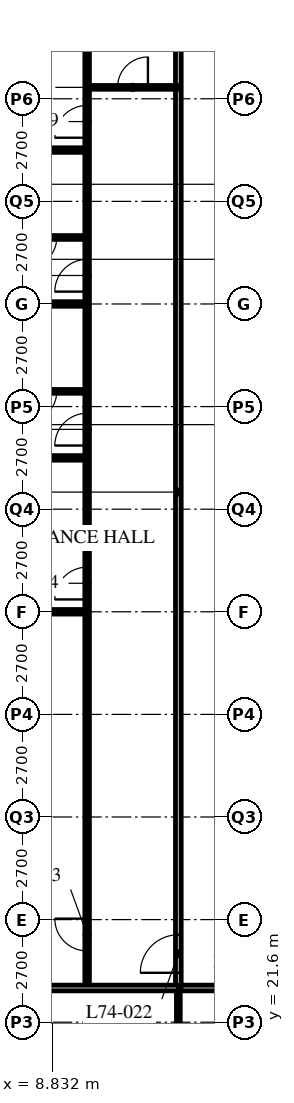
"""IFC4 building model, lengths in metres.
Left out: names, types, materials, properties, quantities, classifications, styles, units other than length and angle.
Written with IfcOpenShell. Run it as: python <this file> out.ifc"""

import sys

from ifc_helpers import new_model, si_unit, direction, frame, frame_2d, origin, place, context, subcontext, project, spatial, rectangle, extrude, element, fill, save


model = new_model("IFC4")
c1 = context("Model", 3, precision=1e-05, world=origin(), true_north=direction((0.0, 1.0)))
c2 = subcontext(c1, "Body", "Model", "MODEL_VIEW")
j1 = project(units=[si_unit("LENGTHUNIT", "METRE"), si_unit("PLANEANGLEUNIT", "RADIAN")], contexts=[c1])
p1 = place(None, origin())
s1 = spatial("IfcSite", under=j1, at=p1, CompositionType="ELEMENT")
p2 = place(p1, origin())
s2 = spatial("IfcBuilding", under=s1, at=p2, CompositionType="ELEMENT")
p3 = place(p2, frame((0.0, 0.0, 289.2)))
s3 = spatial("IfcBuildingStorey", under=s2, at=p3, CompositionType="ELEMENT", Elevation=289.2)
p4 = place(p3, frame((12.15, 22.5, 0.0), z_axis=(0.0, 0.0, 1.0), x_axis=(1.0, 0.0, 0.0)))
e1 = element("IfcWall", 1, at=p4, inside=s3, PredefinedType="PARTITIONING", context=c2, shape_type="SweptSolid", body=[
    extrude(rectangle(XDim=24.3, YDim=0.15, at=frame_2d((12.15, 0.0))), origin(), (0.0, 0.0, 1.0), 3.69),
])
p5 = place(p4, frame((4.45, 0.0, 0.0)))
e2 = element("IfcOpeningElement", 2, at=p5, cuts=e1, PredefinedType="OPENING", context=c2, shape_type="SweptSolid", body=[
    extrude(rectangle(XDim=1.0, YDim=2.1, at=frame_2d((0.5, 1.05))), frame((0.0, 0.085, 0.0), z_axis=(0.0, -1.0, 0.0), x_axis=(1.0, 0.0, 0.0)), (0.0, 0.0, 1.0), 0.17),
])
p6 = place(p4, frame((22.6, 0.0, 0.0)))
e3 = element("IfcOpeningElement", 3, at=p6, cuts=e1, PredefinedType="OPENING", context=c2, shape_type="SweptSolid", body=[
    extrude(rectangle(XDim=1.0, YDim=2.1, at=frame_2d((0.5, 1.05))), frame((0.0, 0.085, 0.0), z_axis=(0.0, -1.0, 0.0), x_axis=(1.0, 0.0, 0.0)), (0.0, 0.0, 1.0), 0.17),
])
p7 = place(p4, frame((2.625, 0.0, 0.0)))
e4 = element("IfcOpeningElement", 4, at=p7, cuts=e1, PredefinedType="OPENING", context=c2, shape_type="SweptSolid", body=[
    extrude(rectangle(XDim=1.0, YDim=2.1, at=frame_2d((0.5, 1.05))), frame((0.0, 0.085, 0.0), z_axis=(0.0, -1.0, 0.0), x_axis=(1.0, 0.0, 0.0)), (0.0, 0.0, 1.0), 0.17),
])
p8 = place(p3, frame((12.15, 22.5, 0.0), z_axis=(0.0, 0.0, 1.0), x_axis=(0.0, 1.0, 0.0)))
e5 = element("IfcWall", 5, at=p8, inside=s3, PredefinedType="PARTITIONING", context=c2, shape_type="SweptSolid", body=[
    extrude(rectangle(XDim=26.1, YDim=0.15, at=frame_2d((13.05, 0.0))), origin(), (0.0, 0.0, 1.0), 3.69),
])
p9 = place(p8, frame((0.4, 0.0, 0.0)))
e6 = element("IfcOpeningElement", 6, at=p9, cuts=e5, PredefinedType="OPENING", context=c2, shape_type="SweptSolid", body=[
    extrude(rectangle(XDim=1.0, YDim=2.1, at=frame_2d((0.5, 1.05))), frame((0.0, 0.085, 0.0), z_axis=(0.0, -1.0, 0.0), x_axis=(1.0, 0.0, 0.0)), (0.0, 0.0, 1.0), 0.17),
])
p10 = place(p3, frame((9.75, 22.5, 0.0), z_axis=(0.0, 0.0, 1.0), x_axis=(0.0, 1.0, 0.0)))
e7 = element("IfcWall", 7, at=p10, inside=s3, PredefinedType="PARTITIONING", context=c2, shape_type="SweptSolid", body=[
    extrude(rectangle(XDim=26.1, YDim=0.12, at=frame_2d((13.05, 0.0))), origin(), (0.0, 0.0, 1.0), 3.69),
])
p11 = place(p10, frame((0.975, 0.0, 0.0)))
e8 = element("IfcOpeningElement", 8, at=p11, cuts=e7, PredefinedType="OPENING", context=c2, shape_type="SweptSolid", body=[
    extrude(rectangle(XDim=0.85, YDim=2.1, at=frame_2d((0.425, 1.05))), frame((0.0, 0.07, 0.0), z_axis=(0.0, -1.0, 0.0), x_axis=(1.0, 0.0, 0.0)), (0.0, 0.0, 1.0), 0.14),
])
p12 = place(p10, frame((10.225, 0.0, 0.0)))
e9 = element("IfcOpeningElement", 9, at=p12, cuts=e7, PredefinedType="OPENING", context=c2, shape_type="SweptSolid", body=[
    extrude(rectangle(XDim=0.85, YDim=2.1, at=frame_2d((0.425, 1.05))), frame((0.0, 0.07, 0.0), z_axis=(0.0, -1.0, 0.0), x_axis=(1.0, 0.0, 0.0)), (0.0, 0.0, 1.0), 0.14),
])
p13 = place(p10, frame((14.275, 0.0, 0.0)))
e10 = element("IfcOpeningElement", 10, at=p13, cuts=e7, PredefinedType="OPENING", context=c2, shape_type="SweptSolid", body=[
    extrude(rectangle(XDim=0.85, YDim=2.1, at=frame_2d((0.425, 1.05))), frame((0.0, 0.07, 0.0), z_axis=(0.0, -1.0, 0.0), x_axis=(1.0, 0.0, 0.0)), (0.0, 0.0, 1.0), 0.14),
])
p14 = place(p10, frame((18.325, 0.0, 0.0)))
e11 = element("IfcOpeningElement", 11, at=p14, cuts=e7, PredefinedType="OPENING", context=c2, shape_type="SweptSolid", body=[
    extrude(rectangle(XDim=0.85, YDim=2.1, at=frame_2d((0.425, 1.05))), frame((0.0, 0.07, 0.0), z_axis=(0.0, -1.0, 0.0), x_axis=(1.0, 0.0, 0.0)), (0.0, 0.0, 1.0), 0.14),
])
p15 = place(p10, frame((22.375, 0.0, 0.0)))
e12 = element("IfcOpeningElement", 12, at=p15, cuts=e7, PredefinedType="OPENING", context=c2, shape_type="SweptSolid", body=[
    extrude(rectangle(XDim=0.85, YDim=2.1, at=frame_2d((0.425, 1.05))), frame((0.0, 0.07, 0.0), z_axis=(0.0, -1.0, 0.0), x_axis=(1.0, 0.0, 0.0)), (0.0, 0.0, 1.0), 0.14),
])
p16 = place(p3, frame((12.15, 46.2, 0.0), z_axis=(0.0, 0.0, 1.0), x_axis=(-1.0, 0.0, 0.0)))
e13 = element("IfcWall", 13, at=p16, inside=s3, PredefinedType="PARTITIONING", context=c2, shape_type="SweptSolid", body=[
    extrude(rectangle(XDim=2.4, YDim=0.1, at=frame_2d((1.2, 0.0))), origin(), (0.0, 0.0, 1.0), 3.69),
])
p17 = place(p16, frame((0.8, 0.0, 0.0)))
e14 = element("IfcOpeningElement", 14, at=p17, cuts=e13, PredefinedType="OPENING", context=c2, shape_type="SweptSolid", body=[
    extrude(rectangle(XDim=0.8, YDim=2.1, at=frame_2d((0.4, 1.05))), frame((0.0, 0.06, 0.0), z_axis=(0.0, -1.0, 0.0), x_axis=(1.0, 0.0, 0.0)), (0.0, 0.0, 1.0), 0.12),
])
p18 = place(p3, frame((9.75, 32.4, 0.0), z_axis=(0.0, 0.0, 1.0), x_axis=(-1.0, 0.0, 0.0)))
e15 = element("IfcWall", 15, at=p18, inside=s3, PredefinedType="PARTITIONING", context=c2, shape_type="SweptSolid", body=[
    extrude(rectangle(XDim=9.45, YDim=0.12, at=frame_2d((4.725, 0.0))), origin(), (0.0, 0.0, 1.0), 3.078),
])
p19 = place(p3, frame((9.75, 38.2, 0.0), z_axis=(0.0, 0.0, 1.0), x_axis=(-1.0, 0.0, 0.0)))
e16 = element("IfcWall", 16, at=p19, inside=s3, PredefinedType="PARTITIONING", context=c2, shape_type="SweptSolid", body=[
    extrude(rectangle(XDim=2.4, YDim=0.1, at=frame_2d((1.2, 0.0))), origin(), (0.0, 0.0, 1.0), 3.69),
])
p20 = place(p19, frame((0.8, 0.0, 0.0)))
e17 = element("IfcOpeningElement", 17, at=p20, cuts=e16, PredefinedType="OPENING", context=c2, shape_type="SweptSolid", body=[
    extrude(rectangle(XDim=0.8, YDim=2.1, at=frame_2d((0.4, 1.05))), frame((0.0, 0.06, 0.0), z_axis=(0.0, -1.0, 0.0), x_axis=(1.0, 0.0, 0.0)), (0.0, 0.0, 1.0), 0.12),
])
p21 = place(p3, frame((9.75, 36.45, 0.0), z_axis=(0.0, 0.0, 1.0), x_axis=(-1.0, 0.0, 0.0)))
e18 = element("IfcWall", 18, at=p21, inside=s3, PredefinedType="PARTITIONING", context=c2, shape_type="SweptSolid", body=[
    extrude(rectangle(XDim=9.45, YDim=0.12, at=frame_2d((4.725, 0.0))), origin(), (0.0, 0.0, 1.0), 3.69),
])
p22 = place(p3, frame((9.75, 42.25, 0.0), z_axis=(0.0, 0.0, 1.0), x_axis=(-1.0, 0.0, 0.0)))
e19 = element("IfcWall", 19, at=p22, inside=s3, PredefinedType="PARTITIONING", context=c2, shape_type="SweptSolid", body=[
    extrude(rectangle(XDim=2.4, YDim=0.1, at=frame_2d((1.2, 0.0))), origin(), (0.0, 0.0, 1.0), 3.69),
])
p23 = place(p22, frame((0.8, 0.0, 0.0)))
e20 = element("IfcOpeningElement", 20, at=p23, cuts=e19, PredefinedType="OPENING", context=c2, shape_type="SweptSolid", body=[
    extrude(rectangle(XDim=0.8, YDim=2.1, at=frame_2d((0.4, 1.05))), frame((0.0, 0.06, 0.0), z_axis=(0.0, -1.0, 0.0), x_axis=(1.0, 0.0, 0.0)), (0.0, 0.0, 1.0), 0.12),
])
p24 = place(p3, frame((9.75, 40.5, 0.0), z_axis=(0.0, 0.0, 1.0), x_axis=(-1.0, 0.0, 0.0)))
e21 = element("IfcWall", 21, at=p24, inside=s3, PredefinedType="PARTITIONING", context=c2, shape_type="SweptSolid", body=[
    extrude(rectangle(XDim=9.45, YDim=0.12, at=frame_2d((4.725, 0.0))), origin(), (0.0, 0.0, 1.0), 3.078),
])
p25 = place(p3, frame((9.75, 44.55, 0.0), z_axis=(0.0, 0.0, 1.0), x_axis=(-1.0, 0.0, 0.0)))
e22 = element("IfcWall", 22, at=p25, inside=s3, PredefinedType="PARTITIONING", context=c2, shape_type="SweptSolid", body=[
    extrude(rectangle(XDim=9.45, YDim=0.12, at=frame_2d((4.725, 0.0))), origin(), (0.0, 0.0, 1.0), 3.69),
])
p26 = place(p3, frame((12.15, 22.5, 0.0), z_axis=(0.0, 0.0, 1.0), x_axis=(0.0, -1.0, 0.0)))
e23 = element("IfcWall", 23, at=p26, inside=s3, PredefinedType="PARTITIONING", context=c2, shape_type="SweptSolid", body=[
    extrude(rectangle(XDim=2.4, YDim=0.1, at=frame_2d((1.2, 0.0))), origin(), (0.0, 0.0, 1.0), 3.69),
])
p27 = place(p3, frame((4.35, 22.5, 0.0), z_axis=(0.0, 0.0, 1.0), x_axis=(1.0, 0.0, 0.0)))
e24 = element("IfcWall", 24, at=p27, inside=s3, PredefinedType="PARTITIONING", context=c2, shape_type="SweptSolid", body=[
    extrude(rectangle(XDim=7.8, YDim=0.15, at=frame_2d((3.9, 0.0))), origin(), (0.0, 0.0, 1.0), 3.69),
])
p28 = place(p17, origin())
e25 = element("IfcDoor", 25, at=p28, inside=s3, OperationType="SINGLE_SWING_RIGHT", PredefinedType="DOOR", context=c2, shape_type="SweptSolid", body=[
    extrude(rectangle(XDim=0.8, YDim=2.1, at=frame_2d((0.4, 1.05))), frame((0.0, 0.025, 0.0), z_axis=(0.0, -1.0, 0.0), x_axis=(1.0, 0.0, 0.0)), (0.0, 0.0, 1.0), 0.05),
])
fill(e14, e25)
p29 = place(p9, origin())
e26 = element("IfcDoor", 26, at=p29, inside=s3, OperationType="SINGLE_SWING_LEFT", PredefinedType="DOOR", context=c2, shape_type="SweptSolid", body=[
    extrude(rectangle(XDim=1.0, YDim=2.1, at=frame_2d((0.5, 1.05))), frame((0.0, 0.025, 0.0), z_axis=(0.0, -1.0, 0.0), x_axis=(1.0, 0.0, 0.0)), (0.0, 0.0, 1.0), 0.05),
])
fill(e6, e26)
p30 = place(p11, origin())
e27 = element("IfcDoor", 27, at=p30, inside=s3, OperationType="SINGLE_SWING_RIGHT", PredefinedType="DOOR", context=c2, shape_type="SweptSolid", body=[
    extrude(rectangle(XDim=0.85, YDim=2.1, at=frame_2d((0.425, 1.05))), frame((0.0, 0.025, 0.0), z_axis=(0.0, -1.0, 0.0), x_axis=(1.0, 0.0, 0.0)), (0.0, 0.0, 1.0), 0.05),
])
fill(e8, e27)
p31 = place(p12, origin())
e28 = element("IfcDoor", 28, at=p31, inside=s3, OperationType="SINGLE_SWING_LEFT", PredefinedType="DOOR", context=c2, shape_type="SweptSolid", body=[
    extrude(rectangle(XDim=0.85, YDim=2.1, at=frame_2d((0.425, 1.05))), frame((0.0, 0.025, 0.0), z_axis=(0.0, -1.0, 0.0), x_axis=(1.0, 0.0, 0.0)), (0.0, 0.0, 1.0), 0.05),
])
fill(e9, e28)
p32 = place(p20, origin())
e29 = element("IfcDoor", 29, at=p32, inside=s3, OperationType="SINGLE_SWING_RIGHT", PredefinedType="DOOR", context=c2, shape_type="SweptSolid", body=[
    extrude(rectangle(XDim=0.8, YDim=2.1, at=frame_2d((0.4, 1.05))), frame((0.0, 0.025, 0.0), z_axis=(0.0, -1.0, 0.0), x_axis=(1.0, 0.0, 0.0)), (0.0, 0.0, 1.0), 0.05),
])
fill(e17, e29)
p33 = place(p13, origin())
e30 = element("IfcDoor", 30, at=p33, inside=s3, OperationType="SINGLE_SWING_LEFT", PredefinedType="DOOR", context=c2, shape_type="SweptSolid", body=[
    extrude(rectangle(XDim=0.85, YDim=2.1, at=frame_2d((0.425, 1.05))), frame((0.0, 0.025, 0.0), z_axis=(0.0, -1.0, 0.0), x_axis=(1.0, 0.0, 0.0)), (0.0, 0.0, 1.0), 0.05),
])
fill(e10, e30)
p34 = place(p23, origin())
e31 = element("IfcDoor", 31, at=p34, inside=s3, OperationType="SINGLE_SWING_RIGHT", PredefinedType="DOOR", context=c2, shape_type="SweptSolid", body=[
    extrude(rectangle(XDim=0.8, YDim=2.1, at=frame_2d((0.4, 1.05))), frame((0.0, 0.025, 0.0), z_axis=(0.0, -1.0, 0.0), x_axis=(1.0, 0.0, 0.0)), (0.0, 0.0, 1.0), 0.05),
])
fill(e20, e31)
p35 = place(p14, origin())
e32 = element("IfcDoor", 32, at=p35, inside=s3, OperationType="SINGLE_SWING_LEFT", PredefinedType="DOOR", context=c2, shape_type="SweptSolid", body=[
    extrude(rectangle(XDim=0.85, YDim=2.1, at=frame_2d((0.425, 1.05))), frame((0.0, 0.025, 0.0), z_axis=(0.0, -1.0, 0.0), x_axis=(1.0, 0.0, 0.0)), (0.0, 0.0, 1.0), 0.05),
])
fill(e11, e32)
p36 = place(p15, origin())
e33 = element("IfcDoor", 33, at=p36, inside=s3, OperationType="SINGLE_SWING_LEFT", PredefinedType="DOOR", context=c2, shape_type="SweptSolid", body=[
    extrude(rectangle(XDim=0.85, YDim=2.1, at=frame_2d((0.425, 1.05))), frame((0.0, 0.025, 0.0), z_axis=(0.0, -1.0, 0.0), x_axis=(1.0, 0.0, 0.0)), (0.0, 0.0, 1.0), 0.05),
])
fill(e12, e33)
save(model, sys.argv[1])
